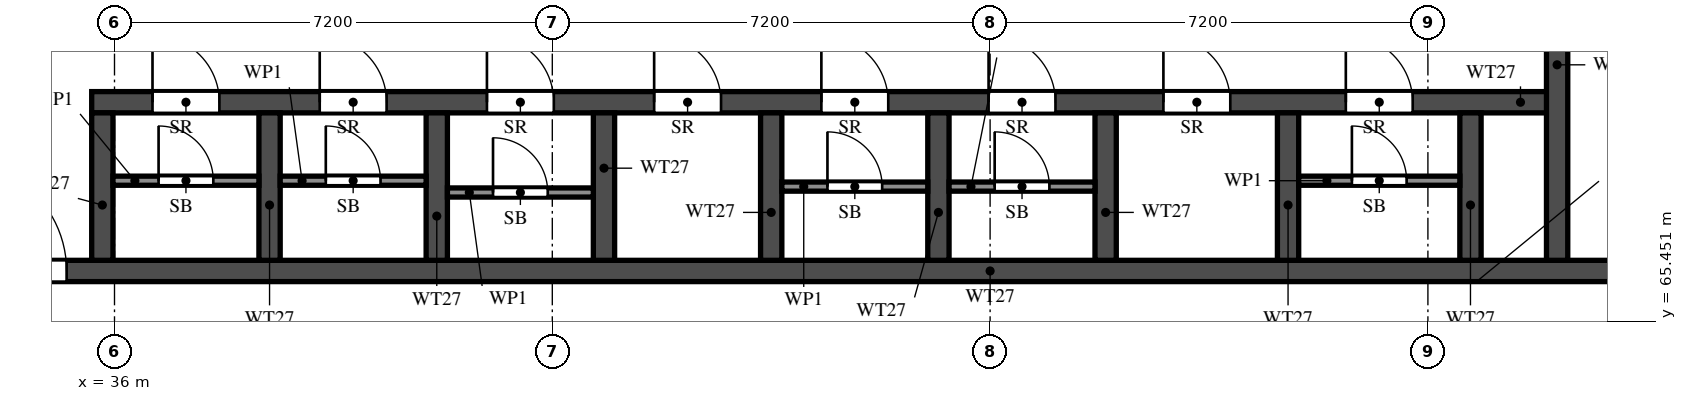
"""IFC4 building model, lengths in metres.
Left out: names, types, materials, properties, quantities, classifications, styles, units other than length and angle.
Written with IfcOpenShell. Run it as: python <this file> out.ifc"""

import sys

from ifc_helpers import new_model, si_unit, direction, frame, frame_2d, origin, place, context, subcontext, project, spatial, rectangle, extrude, element, fill, save


model = new_model("IFC4")
c1 = context("Model", 3, precision=1e-05, world=origin(), true_north=direction((0.0, 1.0)))
c2 = subcontext(c1, "Body", "Model", "MODEL_VIEW")
j1 = project(units=[si_unit("LENGTHUNIT", "METRE"), si_unit("PLANEANGLEUNIT", "RADIAN")], contexts=[c1])
p1 = place(None, origin())
s1 = spatial("IfcSite", under=j1, at=p1, CompositionType="ELEMENT")
p2 = place(p1, origin())
s2 = spatial("IfcBuilding", under=s1, at=p2, CompositionType="ELEMENT")
p3 = place(p2, frame((0.0, 0.0, 157.0)))
s3 = spatial("IfcBuildingStorey", under=s2, at=p3, CompositionType="ELEMENT", Elevation=157.0)
p4 = place(p3, frame((29.7, 66.275, 0.0), z_axis=(0.0, 0.0, 1.0), x_axis=(1.0, 0.0, 0.0)))
e1 = element("IfcWall", 1, at=p4, inside=s3, PredefinedType="SHEAR", context=c2, shape_type="SweptSolid", body=[
    extrude(rectangle(XDim=41.4, YDim=0.35, at=frame_2d((20.7, 0.0))), origin(), (0.0, 0.0, 1.0), 3.2),
])
p5 = place(p4, frame((0.925, 0.0, 0.0)))
e2 = element("IfcOpeningElement", 2, at=p5, cuts=e1, PredefinedType="OPENING", context=c2, shape_type="SweptSolid", body=[
    extrude(rectangle(XDim=1.1, YDim=2.1, at=frame_2d((0.55, 1.05))), frame((0.0, 0.185, 0.0), z_axis=(0.0, -1.0, 0.0), x_axis=(1.0, 0.0, 0.0)), (0.0, 0.0, 1.0), 0.37),
])
p6 = place(p4, frame((3.712, 0.0, 0.0)))
e3 = element("IfcOpeningElement", 3, at=p6, cuts=e1, PredefinedType="OPENING", context=c2, shape_type="SweptSolid", body=[
    extrude(rectangle(XDim=1.8, YDim=2.1, at=frame_2d((0.9, 1.05))), frame((0.0, 0.185, 0.0), z_axis=(0.0, -1.0, 0.0), x_axis=(1.0, 0.0, 0.0)), (0.0, 0.0, 1.0), 0.37),
])
p7 = place(p3, frame((35.625, 69.05, 0.0), z_axis=(0.0, 0.0, 1.0), x_axis=(1.0, 0.0, 0.0)))
e4 = element("IfcWall", 4, at=p7, inside=s3, PredefinedType="SHEAR", context=c2, shape_type="SweptSolid", body=[
    extrude(rectangle(XDim=24.1, YDim=0.35, at=frame_2d((12.05, 0.0))), origin(), (0.0, 0.0, 1.0), 3.2),
])
p8 = place(p7, frame((1.0, 0.0, 0.0)))
e5 = element("IfcOpeningElement", 5, at=p8, cuts=e4, PredefinedType="OPENING", context=c2, shape_type="SweptSolid", body=[
    extrude(rectangle(XDim=1.1, YDim=2.1, at=frame_2d((0.55, 1.05))), frame((0.0, 0.185, 0.0), z_axis=(0.0, -1.0, 0.0), x_axis=(1.0, 0.0, 0.0)), (0.0, 0.0, 1.0), 0.37),
])
p9 = place(p7, frame((3.75, 0.0, 0.0)))
e6 = element("IfcOpeningElement", 6, at=p9, cuts=e4, PredefinedType="OPENING", context=c2, shape_type="SweptSolid", body=[
    extrude(rectangle(XDim=1.1, YDim=2.1, at=frame_2d((0.55, 1.05))), frame((0.0, 0.185, 0.0), z_axis=(0.0, -1.0, 0.0), x_axis=(1.0, 0.0, 0.0)), (0.0, 0.0, 1.0), 0.37),
])
p10 = place(p7, frame((6.5, 0.0, 0.0)))
e7 = element("IfcOpeningElement", 7, at=p10, cuts=e4, PredefinedType="OPENING", context=c2, shape_type="SweptSolid", body=[
    extrude(rectangle(XDim=1.1, YDim=2.1, at=frame_2d((0.55, 1.05))), frame((0.0, 0.185, 0.0), z_axis=(0.0, -1.0, 0.0), x_axis=(1.0, 0.0, 0.0)), (0.0, 0.0, 1.0), 0.37),
])
p11 = place(p7, frame((9.25, 0.0, 0.0)))
e8 = element("IfcOpeningElement", 8, at=p11, cuts=e4, PredefinedType="OPENING", context=c2, shape_type="SweptSolid", body=[
    extrude(rectangle(XDim=1.1, YDim=2.1, at=frame_2d((0.55, 1.05))), frame((0.0, 0.185, 0.0), z_axis=(0.0, -1.0, 0.0), x_axis=(1.0, 0.0, 0.0)), (0.0, 0.0, 1.0), 0.37),
])
p12 = place(p7, frame((12.0, 0.0, 0.0)))
e9 = element("IfcOpeningElement", 9, at=p12, cuts=e4, PredefinedType="OPENING", context=c2, shape_type="SweptSolid", body=[
    extrude(rectangle(XDim=1.1, YDim=2.1, at=frame_2d((0.55, 1.05))), frame((0.0, 0.185, 0.0), z_axis=(0.0, -1.0, 0.0), x_axis=(1.0, 0.0, 0.0)), (0.0, 0.0, 1.0), 0.37),
])
p13 = place(p7, frame((14.75, 0.0, 0.0)))
e10 = element("IfcOpeningElement", 10, at=p13, cuts=e4, PredefinedType="OPENING", context=c2, shape_type="SweptSolid", body=[
    extrude(rectangle(XDim=1.1, YDim=2.1, at=frame_2d((0.55, 1.05))), frame((0.0, 0.185, 0.0), z_axis=(0.0, -1.0, 0.0), x_axis=(1.0, 0.0, 0.0)), (0.0, 0.0, 1.0), 0.37),
])
p14 = place(p7, frame((17.625, 0.0, 0.0)))
e11 = element("IfcOpeningElement", 11, at=p14, cuts=e4, PredefinedType="OPENING", context=c2, shape_type="SweptSolid", body=[
    extrude(rectangle(XDim=1.1, YDim=2.1, at=frame_2d((0.55, 1.05))), frame((0.0, 0.185, 0.0), z_axis=(0.0, -1.0, 0.0), x_axis=(1.0, 0.0, 0.0)), (0.0, 0.0, 1.0), 0.37),
])
p15 = place(p7, frame((20.625, 0.0, 0.0)))
e12 = element("IfcOpeningElement", 12, at=p15, cuts=e4, PredefinedType="OPENING", context=c2, shape_type="SweptSolid", body=[
    extrude(rectangle(XDim=1.1, YDim=2.1, at=frame_2d((0.55, 1.05))), frame((0.0, 0.185, 0.0), z_axis=(0.0, -1.0, 0.0), x_axis=(1.0, 0.0, 0.0)), (0.0, 0.0, 1.0), 0.37),
])
p16 = place(p3, frame((59.725, 66.45, 0.0), z_axis=(0.0, 0.0, 1.0), x_axis=(0.0, 1.0, 0.0)))
e13 = element("IfcWall", 13, at=p16, inside=s3, PredefinedType="SHEAR", context=c2, shape_type="SweptSolid", body=[
    extrude(rectangle(XDim=6.125, YDim=0.35, at=frame_2d((3.062, 0.0))), origin(), (0.0, 0.0, 1.0), 3.2),
])
p17 = place(p16, frame((3.85, 0.0, 0.0)))
e14 = element("IfcOpeningElement", 14, at=p17, cuts=e13, PredefinedType="OPENING", context=c2, shape_type="SweptSolid", body=[
    extrude(rectangle(XDim=1.2, YDim=2.1, at=frame_2d((0.6, 1.05))), frame((0.0, 0.185, 0.0), z_axis=(0.0, -1.0, 0.0), x_axis=(1.0, 0.0, 0.0)), (0.0, 0.0, 1.0), 0.37),
])
for number, where, z_axis, x_axis in (
    (15, (35.8, 66.45, 0.0), (0.0, 0.0, 1.0), (0.0, 1.0, 0.0)),
    (16, (38.55, 66.45, 0.0), (0.0, 0.0, 1.0), (0.0, 1.0, 0.0)),
    (17, (41.3, 66.45, 0.0), (0.0, 0.0, 1.0), (0.0, 1.0, 0.0)),
    (18, (44.05, 66.45, 0.0), (0.0, 0.0, 1.0), (0.0, 1.0, 0.0)),
    (19, (46.8, 66.45, 0.0), (0.0, 0.0, 1.0), (0.0, 1.0, 0.0)),
    (20, (49.55, 66.45, 0.0), (0.0, 0.0, 1.0), (0.0, 1.0, 0.0)),
    (21, (52.3, 66.45, 0.0), (0.0, 0.0, 1.0), (0.0, 1.0, 0.0)),
    (22, (55.3, 66.45, 0.0), (0.0, 0.0, 1.0), (0.0, 1.0, 0.0)),
    (23, (58.3, 66.45, 0.0), (0.0, 0.0, 1.0), (0.0, 1.0, 0.0)),
):
    element("IfcWall", number, at=place(p3, frame(where, z_axis=z_axis, x_axis=x_axis)), inside=s3, PredefinedType="SHEAR", context=c2, shape_type="SweptSolid", body=[
        extrude(rectangle(XDim=2.425, YDim=0.35, at=frame_2d((1.212, 0.0))), origin(), (0.0, 0.0, 1.0), 3.2),
    ])
p18 = place(p3, frame((35.975, 67.76, 0.0), z_axis=(0.0, 0.0, 1.0), x_axis=(1.0, 0.0, 0.0)))
e24 = element("IfcWall", 24, at=p18, inside=s3, PredefinedType="PARTITIONING", context=c2, shape_type="SweptSolid", body=[
    extrude(rectangle(XDim=2.4, YDim=0.15, at=frame_2d((1.2, 0.0))), origin(), (0.0, 0.0, 1.0), 3.2),
])
p19 = place(p18, frame((0.75, 0.0, 0.0)))
e25 = element("IfcOpeningElement", 25, at=p19, cuts=e24, PredefinedType="OPENING", context=c2, shape_type="SweptSolid", body=[
    extrude(rectangle(XDim=0.9, YDim=2.1, at=frame_2d((0.45, 1.05))), frame((0.0, 0.085, 0.0), z_axis=(0.0, -1.0, 0.0), x_axis=(1.0, 0.0, 0.0)), (0.0, 0.0, 1.0), 0.17),
])
p20 = place(p3, frame((38.725, 67.76, 0.0), z_axis=(0.0, 0.0, 1.0), x_axis=(1.0, 0.0, 0.0)))
e26 = element("IfcWall", 26, at=p20, inside=s3, PredefinedType="PARTITIONING", context=c2, shape_type="SweptSolid", body=[
    extrude(rectangle(XDim=2.4, YDim=0.15, at=frame_2d((1.2, 0.0))), origin(), (0.0, 0.0, 1.0), 3.2),
])
p21 = place(p20, frame((0.75, 0.0, 0.0)))
e27 = element("IfcOpeningElement", 27, at=p21, cuts=e26, PredefinedType="OPENING", context=c2, shape_type="SweptSolid", body=[
    extrude(rectangle(XDim=0.9, YDim=2.1, at=frame_2d((0.45, 1.05))), frame((0.0, 0.085, 0.0), z_axis=(0.0, -1.0, 0.0), x_axis=(1.0, 0.0, 0.0)), (0.0, 0.0, 1.0), 0.17),
])
p22 = place(p3, frame((41.475, 67.565, 0.0), z_axis=(0.0, 0.0, 1.0), x_axis=(1.0, 0.0, 0.0)))
e28 = element("IfcWall", 28, at=p22, inside=s3, PredefinedType="PARTITIONING", context=c2, shape_type="SweptSolid", body=[
    extrude(rectangle(XDim=2.4, YDim=0.15, at=frame_2d((1.2, 0.0))), origin(), (0.0, 0.0, 1.0), 3.2),
])
p23 = place(p22, frame((0.75, 0.0, 0.0)))
e29 = element("IfcOpeningElement", 29, at=p23, cuts=e28, PredefinedType="OPENING", context=c2, shape_type="SweptSolid", body=[
    extrude(rectangle(XDim=0.9, YDim=2.1, at=frame_2d((0.45, 1.05))), frame((0.0, 0.085, 0.0), z_axis=(0.0, -1.0, 0.0), x_axis=(1.0, 0.0, 0.0)), (0.0, 0.0, 1.0), 0.17),
])
p24 = place(p3, frame((46.975, 67.663, 0.0), z_axis=(0.0, 0.0, 1.0), x_axis=(1.0, 0.0, 0.0)))
e30 = element("IfcWall", 30, at=p24, inside=s3, PredefinedType="PARTITIONING", context=c2, shape_type="SweptSolid", body=[
    extrude(rectangle(XDim=2.4, YDim=0.15, at=frame_2d((1.2, 0.0))), origin(), (0.0, 0.0, 1.0), 3.2),
])
p25 = place(p24, frame((0.75, 0.0, 0.0)))
e31 = element("IfcOpeningElement", 31, at=p25, cuts=e30, PredefinedType="OPENING", context=c2, shape_type="SweptSolid", body=[
    extrude(rectangle(XDim=0.9, YDim=2.1, at=frame_2d((0.45, 1.05))), frame((0.0, 0.085, 0.0), z_axis=(0.0, -1.0, 0.0), x_axis=(1.0, 0.0, 0.0)), (0.0, 0.0, 1.0), 0.17),
])
p26 = place(p3, frame((49.725, 67.663, 0.0), z_axis=(0.0, 0.0, 1.0), x_axis=(1.0, 0.0, 0.0)))
e32 = element("IfcWall", 32, at=p26, inside=s3, PredefinedType="PARTITIONING", context=c2, shape_type="SweptSolid", body=[
    extrude(rectangle(XDim=2.4, YDim=0.15, at=frame_2d((1.2, 0.0))), origin(), (0.0, 0.0, 1.0), 3.2),
])
p27 = place(p26, frame((0.75, 0.0, 0.0)))
e33 = element("IfcOpeningElement", 33, at=p27, cuts=e32, PredefinedType="OPENING", context=c2, shape_type="SweptSolid", body=[
    extrude(rectangle(XDim=0.9, YDim=2.1, at=frame_2d((0.45, 1.05))), frame((0.0, 0.085, 0.0), z_axis=(0.0, -1.0, 0.0), x_axis=(1.0, 0.0, 0.0)), (0.0, 0.0, 1.0), 0.17),
])
p28 = place(p3, frame((55.475, 67.76, 0.0), z_axis=(0.0, 0.0, 1.0), x_axis=(1.0, 0.0, 0.0)))
e34 = element("IfcWall", 34, at=p28, inside=s3, PredefinedType="PARTITIONING", context=c2, shape_type="SweptSolid", body=[
    extrude(rectangle(XDim=2.65, YDim=0.15, at=frame_2d((1.325, 0.0))), origin(), (0.0, 0.0, 1.0), 3.2),
])
p29 = place(p28, frame((0.875, 0.0, 0.0)))
e35 = element("IfcOpeningElement", 35, at=p29, cuts=e34, PredefinedType="OPENING", context=c2, shape_type="SweptSolid", body=[
    extrude(rectangle(XDim=0.9, YDim=2.1, at=frame_2d((0.45, 1.05))), frame((0.0, 0.085, 0.0), z_axis=(0.0, -1.0, 0.0), x_axis=(1.0, 0.0, 0.0)), (0.0, 0.0, 1.0), 0.17),
])
p30 = place(p6, origin())
e36 = element("IfcDoor", 36, at=p30, inside=s3, OperationType="DOUBLE_DOOR_SINGLE_SWING", PredefinedType="DOOR", context=c2, shape_type="SweptSolid", body=[
    extrude(rectangle(XDim=1.8, YDim=2.1, at=frame_2d((0.9, 1.05))), frame((0.0, 0.025, 0.0), z_axis=(0.0, -1.0, 0.0), x_axis=(1.0, 0.0, 0.0)), (0.0, 0.0, 1.0), 0.05),
])
fill(e3, e36)
p31 = place(p8, origin())
e37 = element("IfcDoor", 37, at=p31, inside=s3, OperationType="SINGLE_SWING_RIGHT", PredefinedType="DOOR", context=c2, shape_type="SweptSolid", body=[
    extrude(rectangle(XDim=1.1, YDim=2.1, at=frame_2d((0.55, 1.05))), frame((0.0, 0.025, 0.0), z_axis=(0.0, -1.0, 0.0), x_axis=(1.0, 0.0, 0.0)), (0.0, 0.0, 1.0), 0.05),
])
fill(e5, e37)
p32 = place(p19, origin())
e38 = element("IfcDoor", 38, at=p32, inside=s3, OperationType="SINGLE_SWING_LEFT", PredefinedType="DOOR", context=c2, shape_type="SweptSolid", body=[
    extrude(rectangle(XDim=0.9, YDim=2.1, at=frame_2d((0.45, 1.05))), frame((0.0, 0.025, 0.0), z_axis=(0.0, -1.0, 0.0), x_axis=(1.0, 0.0, 0.0)), (0.0, 0.0, 1.0), 0.05),
])
fill(e25, e38)
p33 = place(p9, origin())
e39 = element("IfcDoor", 39, at=p33, inside=s3, OperationType="SINGLE_SWING_LEFT", PredefinedType="DOOR", context=c2, shape_type="SweptSolid", body=[
    extrude(rectangle(XDim=1.1, YDim=2.1, at=frame_2d((0.55, 1.05))), frame((0.0, 0.025, 0.0), z_axis=(0.0, -1.0, 0.0), x_axis=(1.0, 0.0, 0.0)), (0.0, 0.0, 1.0), 0.05),
])
fill(e6, e39)
p34 = place(p21, origin())
e40 = element("IfcDoor", 40, at=p34, inside=s3, OperationType="SINGLE_SWING_RIGHT", PredefinedType="DOOR", context=c2, shape_type="SweptSolid", body=[
    extrude(rectangle(XDim=0.9, YDim=2.1, at=frame_2d((0.45, 1.05))), frame((0.0, 0.025, 0.0), z_axis=(0.0, -1.0, 0.0), x_axis=(1.0, 0.0, 0.0)), (0.0, 0.0, 1.0), 0.05),
])
fill(e27, e40)
p35 = place(p10, origin())
e41 = element("IfcDoor", 41, at=p35, inside=s3, OperationType="SINGLE_SWING_RIGHT", PredefinedType="DOOR", context=c2, shape_type="SweptSolid", body=[
    extrude(rectangle(XDim=1.1, YDim=2.1, at=frame_2d((0.55, 1.05))), frame((0.0, 0.025, 0.0), z_axis=(0.0, -1.0, 0.0), x_axis=(1.0, 0.0, 0.0)), (0.0, 0.0, 1.0), 0.05),
])
fill(e7, e41)
p36 = place(p23, origin())
e42 = element("IfcDoor", 42, at=p36, inside=s3, OperationType="SINGLE_SWING_RIGHT", PredefinedType="DOOR", context=c2, shape_type="SweptSolid", body=[
    extrude(rectangle(XDim=0.9, YDim=2.1, at=frame_2d((0.45, 1.05))), frame((0.0, 0.025, 0.0), z_axis=(0.0, -1.0, 0.0), x_axis=(1.0, 0.0, 0.0)), (0.0, 0.0, 1.0), 0.05),
])
fill(e29, e42)
p37 = place(p11, origin())
e43 = element("IfcDoor", 43, at=p37, inside=s3, OperationType="SINGLE_SWING_LEFT", PredefinedType="DOOR", context=c2, shape_type="SweptSolid", body=[
    extrude(rectangle(XDim=1.1, YDim=2.1, at=frame_2d((0.55, 1.05))), frame((0.0, 0.025, 0.0), z_axis=(0.0, -1.0, 0.0), x_axis=(1.0, 0.0, 0.0)), (0.0, 0.0, 1.0), 0.05),
])
fill(e8, e43)
p38 = place(p12, origin())
e44 = element("IfcDoor", 44, at=p38, inside=s3, OperationType="SINGLE_SWING_RIGHT", PredefinedType="DOOR", context=c2, shape_type="SweptSolid", body=[
    extrude(rectangle(XDim=1.1, YDim=2.1, at=frame_2d((0.55, 1.05))), frame((0.0, 0.025, 0.0), z_axis=(0.0, -1.0, 0.0), x_axis=(1.0, 0.0, 0.0)), (0.0, 0.0, 1.0), 0.05),
])
fill(e9, e44)
p39 = place(p25, origin())
e45 = element("IfcDoor", 45, at=p39, inside=s3, OperationType="SINGLE_SWING_RIGHT", PredefinedType="DOOR", context=c2, shape_type="SweptSolid", body=[
    extrude(rectangle(XDim=0.9, YDim=2.1, at=frame_2d((0.45, 1.05))), frame((0.0, 0.025, 0.0), z_axis=(0.0, -1.0, 0.0), x_axis=(1.0, 0.0, 0.0)), (0.0, 0.0, 1.0), 0.05),
])
fill(e31, e45)
p40 = place(p13, origin())
e46 = element("IfcDoor", 46, at=p40, inside=s3, OperationType="SINGLE_SWING_LEFT", PredefinedType="DOOR", context=c2, shape_type="SweptSolid", body=[
    extrude(rectangle(XDim=1.1, YDim=2.1, at=frame_2d((0.55, 1.05))), frame((0.0, 0.025, 0.0), z_axis=(0.0, -1.0, 0.0), x_axis=(1.0, 0.0, 0.0)), (0.0, 0.0, 1.0), 0.05),
])
fill(e10, e46)
p41 = place(p27, origin())
e47 = element("IfcDoor", 47, at=p41, inside=s3, OperationType="SINGLE_SWING_LEFT", PredefinedType="DOOR", context=c2, shape_type="SweptSolid", body=[
    extrude(rectangle(XDim=0.9, YDim=2.1, at=frame_2d((0.45, 1.05))), frame((0.0, 0.025, 0.0), z_axis=(0.0, -1.0, 0.0), x_axis=(1.0, 0.0, 0.0)), (0.0, 0.0, 1.0), 0.05),
])
fill(e33, e47)
p42 = place(p14, origin())
e48 = element("IfcDoor", 48, at=p42, inside=s3, OperationType="SINGLE_SWING_RIGHT", PredefinedType="DOOR", context=c2, shape_type="SweptSolid", body=[
    extrude(rectangle(XDim=1.1, YDim=2.1, at=frame_2d((0.55, 1.05))), frame((0.0, 0.025, 0.0), z_axis=(0.0, -1.0, 0.0), x_axis=(1.0, 0.0, 0.0)), (0.0, 0.0, 1.0), 0.05),
])
fill(e11, e48)
p43 = place(p15, origin())
e49 = element("IfcDoor", 49, at=p43, inside=s3, OperationType="SINGLE_SWING_RIGHT", PredefinedType="DOOR", context=c2, shape_type="SweptSolid", body=[
    extrude(rectangle(XDim=1.1, YDim=2.1, at=frame_2d((0.55, 1.05))), frame((0.0, 0.025, 0.0), z_axis=(0.0, -1.0, 0.0), x_axis=(1.0, 0.0, 0.0)), (0.0, 0.0, 1.0), 0.05),
])
fill(e12, e49)
p44 = place(p29, origin())
e50 = element("IfcDoor", 50, at=p44, inside=s3, OperationType="SINGLE_SWING_LEFT", PredefinedType="DOOR", context=c2, shape_type="SweptSolid", body=[
    extrude(rectangle(XDim=0.9, YDim=2.1, at=frame_2d((0.45, 1.05))), frame((0.0, 0.025, 0.0), z_axis=(0.0, -1.0, 0.0), x_axis=(1.0, 0.0, 0.0)), (0.0, 0.0, 1.0), 0.05),
])
fill(e35, e50)
save(model, sys.argv[1])
